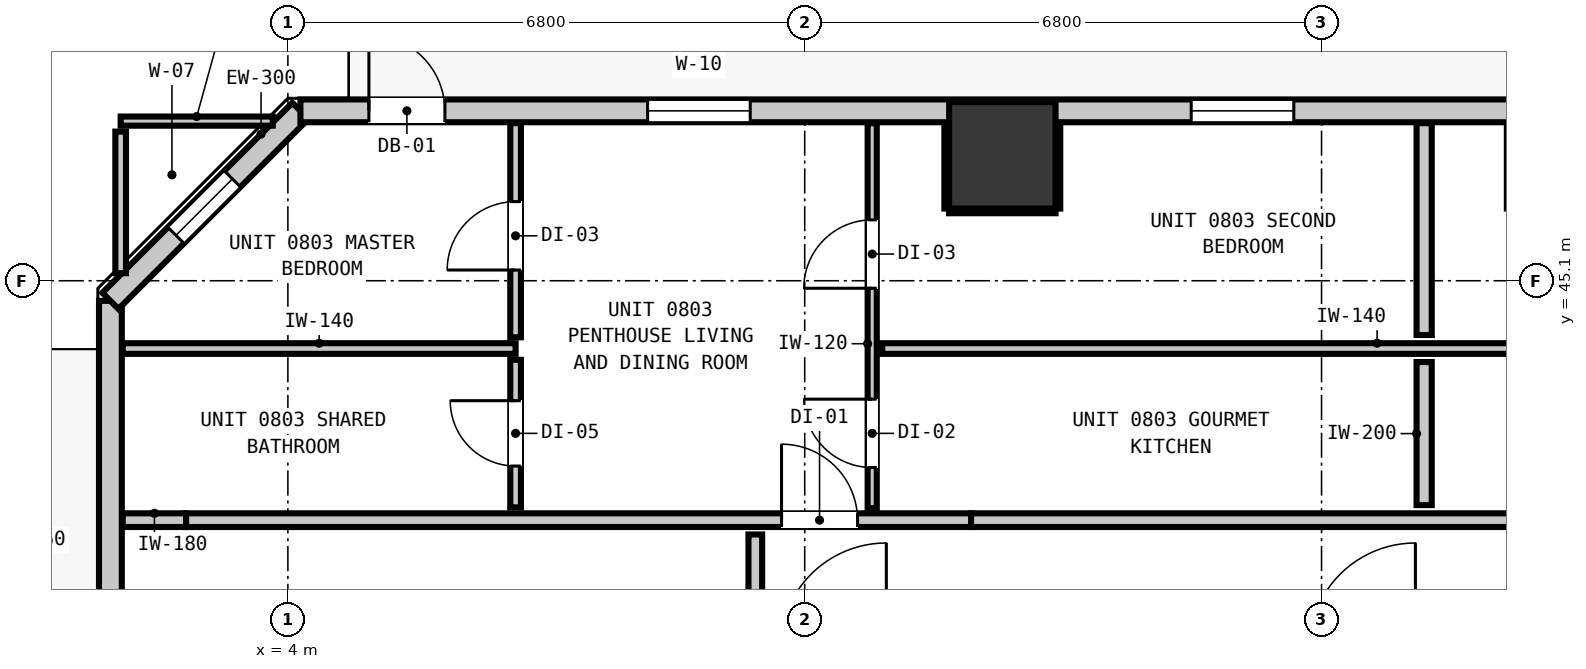
"""IFC4 building model, lengths in metres.
Left out: names, types, materials, properties, quantities, classifications, styles, units other than length and angle.
Written with IfcOpenShell. Run it as: python <this file> out.ifc"""

import sys

from ifc_helpers import new_model, si_unit, direction, frame, frame_2d, origin, origin_2d, place, context, subcontext, project, spatial, rectangle, extrude, element, fill, save


model = new_model("IFC4")
c1 = context("Model", 3, precision=1e-05, world=origin(), true_north=direction((0.0, 1.0)))
c2 = subcontext(c1, "Body", "Model", "MODEL_VIEW")
j1 = project(units=[si_unit("LENGTHUNIT", "METRE"), si_unit("PLANEANGLEUNIT", "RADIAN")], contexts=[c1])
p1 = place(None, origin())
s1 = spatial("IfcSite", under=j1, at=p1, CompositionType="ELEMENT")
p2 = place(p1, origin())
s2 = spatial("IfcBuilding", under=s1, at=p2, CompositionType="ELEMENT")
p3 = place(p2, frame((0.0, 0.0, 31.96)))
s3 = spatial("IfcBuildingStorey", under=s2, at=p3, CompositionType="ELEMENT", Elevation=31.96)
p4 = place(p3, frame((13.4, 46.75, 0.0), z_axis=(0.0, 0.0, 1.0), x_axis=(1.0, 0.0, 0.0)))
e1 = element("IfcColumn", 1, at=p4, inside=s3, PredefinedType="COLUMN", context=c2, shape_type="SweptSolid", body=[
    extrude(rectangle(XDim=1.4, YDim=1.4, at=origin_2d()), origin(), (0.0, 0.0, 1.0), 3.32),
])
p5 = place(p3, frame((1.665, 10.165, 0.0), z_axis=(0.0, 0.0, 1.0), x_axis=(0.0, 1.0, 0.0)))
e2 = element("IfcWall", 2, at=p5, inside=s3, PredefinedType="STANDARD", context=c2, shape_type="SweptSolid", body=[
    extrude(rectangle(XDim=34.67, YDim=0.3, at=frame_2d((17.335, 0.0))), origin(), (0.0, 0.0, 1.0), 3.06),
])
p6 = place(p5, frame((0.901, 0.0, 0.0)))
e3 = element("IfcOpeningElement", 3, at=p6, cuts=e2, PredefinedType="OPENING", context=c2, shape_type="SweptSolid", body=[
    extrude(rectangle(XDim=1.0, YDim=2.15, at=frame_2d((0.5, 1.075))), frame((0.0, 0.16, 0.0), z_axis=(0.0, -1.0, 0.0), x_axis=(1.0, 0.0, 0.0)), (0.0, 0.0, 1.0), 0.32),
])
p7 = place(p5, frame((17.7, 0.0, 0.85)))
e4 = element("IfcOpeningElement", 4, at=p7, cuts=e2, PredefinedType="OPENING", context=c2, shape_type="SweptSolid", body=[
    extrude(rectangle(XDim=1.35, YDim=1.85, at=frame_2d((0.675, 0.925))), frame((0.0, 0.16, 0.0), z_axis=(0.0, -1.0, 0.0), x_axis=(1.0, 0.0, 0.0)), (0.0, 0.0, 1.0), 0.32),
])
p8 = place(p5, frame((13.85, 0.0, 0.85)))
e5 = element("IfcOpeningElement", 5, at=p8, cuts=e2, PredefinedType="OPENING", context=c2, shape_type="SweptSolid", body=[
    extrude(rectangle(XDim=1.35, YDim=1.85, at=frame_2d((0.675, 0.925))), frame((0.0, 0.16, 0.0), z_axis=(0.0, -1.0, 0.0), x_axis=(1.0, 0.0, 0.0)), (0.0, 0.0, 1.0), 0.32),
])
p9 = place(p5, frame((25.87, 0.0, 0.85)))
e6 = element("IfcOpeningElement", 6, at=p9, cuts=e2, PredefinedType="OPENING", context=c2, shape_type="SweptSolid", body=[
    extrude(rectangle(XDim=1.35, YDim=1.85, at=frame_2d((0.675, 0.925))), frame((0.0, 0.16, 0.0), z_axis=(0.0, -1.0, 0.0), x_axis=(1.0, 0.0, 0.0)), (0.0, 0.0, 1.0), 0.32),
])
p10 = place(p3, frame((1.665, 44.835, 0.0), z_axis=(0.0, 0.0, 1.0), x_axis=(0.707106781187, 0.707106781187, 0.0)))
e7 = element("IfcWall", 7, at=p10, inside=s3, PredefinedType="STANDARD", context=c2, shape_type="SweptSolid", body=[
    extrude(rectangle(XDim=3.536, YDim=0.3, at=frame_2d((1.768, 0.0))), origin(), (0.0, 0.0, 1.0), 3.06),
])
p11 = place(p10, frame((1.22, 0.0, 0.85)))
e8 = element("IfcOpeningElement", 8, at=p11, cuts=e7, PredefinedType="OPENING", context=c2, shape_type="SweptSolid", body=[
    extrude(rectangle(XDim=1.05, YDim=1.65, at=frame_2d((0.525, 0.825))), frame((0.0, 0.16, 0.0), z_axis=(0.0, -1.0, 0.0), x_axis=(1.0, 0.0, 0.0)), (0.0, 0.0, 1.0), 0.32),
])
p12 = place(p3, frame((4.165, 47.335, 0.0), z_axis=(0.0, 0.0, 1.0), x_axis=(1.0, 0.0, 0.0)))
e9 = element("IfcWall", 9, at=p12, inside=s3, PredefinedType="STANDARD", context=c2, shape_type="SweptSolid", body=[
    extrude(rectangle(XDim=37.47, YDim=0.3, at=frame_2d((18.735, 0.0))), origin(), (0.0, 0.0, 1.0), 3.06),
])
p13 = place(p12, frame((0.901, 0.0, 0.0)))
e10 = element("IfcOpeningElement", 10, at=p13, cuts=e9, PredefinedType="OPENING", context=c2, shape_type="SweptSolid", body=[
    extrude(rectangle(XDim=1.0, YDim=2.15, at=frame_2d((0.5, 1.075))), frame((0.0, 0.16, 0.0), z_axis=(0.0, -1.0, 0.0), x_axis=(1.0, 0.0, 0.0)), (0.0, 0.0, 1.0), 0.32),
])
p14 = place(p12, frame((4.568, 0.0, 0.85)))
e11 = element("IfcOpeningElement", 11, at=p14, cuts=e9, PredefinedType="OPENING", context=c2, shape_type="SweptSolid", body=[
    extrude(rectangle(XDim=1.35, YDim=1.85, at=frame_2d((0.675, 0.925))), frame((0.0, 0.16, 0.0), z_axis=(0.0, -1.0, 0.0), x_axis=(1.0, 0.0, 0.0)), (0.0, 0.0, 1.0), 0.32),
])
p15 = place(p12, frame((11.72, 0.0, 0.85)))
e12 = element("IfcOpeningElement", 12, at=p15, cuts=e9, PredefinedType="OPENING", context=c2, shape_type="SweptSolid", body=[
    extrude(rectangle(XDim=1.35, YDim=1.85, at=frame_2d((0.675, 0.925))), frame((0.0, 0.16, 0.0), z_axis=(0.0, -1.0, 0.0), x_axis=(1.0, 0.0, 0.0)), (0.0, 0.0, 1.0), 0.32),
])
p16 = place(p12, frame((21.881, 0.0, 0.85)))
e13 = element("IfcOpeningElement", 13, at=p16, cuts=e9, PredefinedType="OPENING", context=c2, shape_type="SweptSolid", body=[
    extrude(rectangle(XDim=1.35, YDim=1.85, at=frame_2d((0.675, 0.925))), frame((0.0, 0.16, 0.0), z_axis=(0.0, -1.0, 0.0), x_axis=(1.0, 0.0, 0.0)), (0.0, 0.0, 1.0), 0.32),
])
p17 = place(p12, frame((18.281, 0.0, 0.85)))
e14 = element("IfcOpeningElement", 14, at=p17, cuts=e9, PredefinedType="OPENING", context=c2, shape_type="SweptSolid", body=[
    extrude(rectangle(XDim=1.35, YDim=1.85, at=frame_2d((0.675, 0.925))), frame((0.0, 0.16, 0.0), z_axis=(0.0, -1.0, 0.0), x_axis=(1.0, 0.0, 0.0)), (0.0, 0.0, 1.0), 0.32),
])
p18 = place(p12, frame((29.263, 0.0, 0.85)))
e15 = element("IfcOpeningElement", 15, at=p18, cuts=e9, PredefinedType="OPENING", context=c2, shape_type="SweptSolid", body=[
    extrude(rectangle(XDim=1.35, YDim=1.85, at=frame_2d((0.675, 0.925))), frame((0.0, 0.16, 0.0), z_axis=(0.0, -1.0, 0.0), x_axis=(1.0, 0.0, 0.0)), (0.0, 0.0, 1.0), 0.32),
])
p19 = place(p12, frame((35.41, 0.0, 0.85)))
e16 = element("IfcOpeningElement", 16, at=p19, cuts=e9, PredefinedType="OPENING", context=c2, shape_type="SweptSolid", body=[
    extrude(rectangle(XDim=1.35, YDim=1.85, at=frame_2d((0.675, 0.925))), frame((0.0, 0.16, 0.0), z_axis=(0.0, -1.0, 0.0), x_axis=(1.0, 0.0, 0.0)), (0.0, 0.0, 1.0), 0.32),
])
p20 = place(p3, frame((1.827, 41.95, 0.0), z_axis=(0.0, 0.0, 1.0), x_axis=(1.0, 0.0, 0.0)))
e17 = element("IfcWall", 17, at=p20, inside=s3, PredefinedType="PARTITIONING", context=c2, shape_type="SweptSolid", body=[
    extrude(rectangle(XDim=0.834, YDim=0.18, at=frame_2d((0.417, 0.0))), origin(), (0.0, 0.0, 1.0), 3.06),
])
p21 = place(p3, frame((2.661, 41.95, 0.0), z_axis=(0.0, 0.0, 1.0), x_axis=(1.0, 0.0, 0.0)))
e18 = element("IfcWall", 18, at=p21, inside=s3, PredefinedType="PARTITIONING", context=c2, shape_type="SweptSolid", body=[
    extrude(rectangle(XDim=10.328, YDim=0.18, at=frame_2d((5.164, 0.0))), origin(), (0.0, 0.0, 1.0), 2.445),
])
p22 = place(p21, frame((7.834, 0.0, 0.0)))
e19 = element("IfcOpeningElement", 19, at=p22, cuts=e18, PredefinedType="OPENING", context=c2, shape_type="SweptSolid", body=[
    extrude(rectangle(XDim=1.0, YDim=2.15, at=frame_2d((0.5, 1.075))), frame((0.0, 0.1, 0.0), z_axis=(0.0, -1.0, 0.0), x_axis=(1.0, 0.0, 0.0)), (0.0, 0.0, 1.0), 0.2),
])
p23 = place(p3, frame((12.989, 41.95, 0.0), z_axis=(0.0, 0.0, 1.0), x_axis=(1.0, 0.0, 0.0)))
e20 = element("IfcWall", 20, at=p23, inside=s3, PredefinedType="PARTITIONING", context=c2, shape_type="SweptSolid", body=[
    extrude(rectangle(XDim=30.984, YDim=0.18, at=frame_2d((15.492, 0.0))), origin(), (0.0, 0.0, 1.0), 3.06),
])
p24 = place(p23, frame((14.765, 0.0, 0.0)))
e21 = element("IfcOpeningElement", 21, at=p24, cuts=e20, PredefinedType="OPENING", context=c2, shape_type="SweptSolid", body=[
    extrude(rectangle(XDim=1.0, YDim=2.15, at=frame_2d((0.5, 1.075))), frame((0.0, 0.1, 0.0), z_axis=(0.0, -1.0, 0.0), x_axis=(1.0, 0.0, 0.0)), (0.0, 0.0, 1.0), 0.2),
])
p25 = place(p3, frame((1.827, 44.208, 0.0), z_axis=(0.0, 0.0, 1.0), x_axis=(1.0, 0.0, 0.0)))
e22 = element("IfcWall", 22, at=p25, inside=s3, PredefinedType="PARTITIONING", context=c2, shape_type="SweptSolid", body=[
    extrude(rectangle(XDim=5.169, YDim=0.14, at=frame_2d((2.584, 0.0))), origin(), (0.0, 0.0, 1.0), 3.06),
])
p26 = place(p3, frame((11.82, 44.208, 0.0), z_axis=(0.0, 0.0, 1.0), x_axis=(1.0, 0.0, 0.0)))
e23 = element("IfcWall", 23, at=p26, inside=s3, PredefinedType="PARTITIONING", context=c2, shape_type="SweptSolid", body=[
    extrude(rectangle(XDim=13.022, YDim=0.14, at=frame_2d((6.511, 0.0))), origin(), (0.0, 0.0, 1.0), 3.06),
])
p27 = place(p3, frame((1.8, 47.2, 0.0), z_axis=(0.0, 0.0, 1.0), x_axis=(1.0, 0.0, 0.0)))
e24 = element("IfcWall", 24, at=p27, inside=s3, PredefinedType="PARTITIONING", context=c2, shape_type="SweptSolid", body=[
    extrude(rectangle(XDim=2.001, YDim=0.12, at=frame_2d((1.0, 0.0))), origin(), (0.0, 0.0, 1.0), 3.06),
])
p28 = place(p3, frame((18.95, 42.148, 0.0), z_axis=(0.0, 0.0, 1.0), x_axis=(0.0, 1.0, 0.0)))
e25 = element("IfcWall", 25, at=p28, inside=s3, PredefinedType="PARTITIONING", context=c2, shape_type="SweptSolid", body=[
    extrude(rectangle(XDim=1.882, YDim=0.2, at=frame_2d((0.941, 0.0))), origin(), (0.0, 0.0, 1.0), 3.06),
])
p29 = place(p3, frame((18.95, 44.386, 0.0), z_axis=(0.0, 0.0, 1.0), x_axis=(0.0, 1.0, 0.0)))
e26 = element("IfcWall", 26, at=p29, inside=s3, PredefinedType="PARTITIONING", context=c2, shape_type="SweptSolid", body=[
    extrude(rectangle(XDim=2.787, YDim=0.2, at=frame_2d((1.394, 0.0))), origin(), (0.0, 0.0, 1.0), 3.06),
])
p30 = place(p3, frame((10.15, 40.438, 0.0), z_axis=(0.0, 0.0, 1.0), x_axis=(0.0, 1.0, 0.0)))
e27 = element("IfcWall", 27, at=p30, inside=s3, PredefinedType="PARTITIONING", context=c2, shape_type="SweptSolid", body=[
    extrude(rectangle(XDim=1.324, YDim=0.18, at=frame_2d((0.662, 0.0))), origin(), (0.0, 0.0, 1.0), 3.06),
])
p31 = place(p3, frame((1.8, 45.199, 0.0), z_axis=(0.0, 0.0, 1.0), x_axis=(0.0, 1.0, 0.0)))
e28 = element("IfcWall", 28, at=p31, inside=s3, PredefinedType="PARTITIONING", context=c2, shape_type="SweptSolid", body=[
    extrude(rectangle(XDim=1.863, YDim=0.14, at=frame_2d((0.932, 0.0))), origin(), (0.0, 0.0, 1.0), 3.06),
])
p32 = place(p3, frame((6.996, 42.118, 0.0), z_axis=(0.0, 0.0, 1.0), x_axis=(0.0, 1.0, 0.0)))
e29 = element("IfcWall", 29, at=p32, inside=s3, PredefinedType="PARTITIONING", context=c2, shape_type="SweptSolid", body=[
    extrude(rectangle(XDim=1.942, YDim=0.14, at=frame_2d((0.971, 0.0))), origin(), (0.0, 0.0, 1.0), 3.06),
])
p33 = place(p32, frame((0.544, 0.0, 0.0)))
e30 = element("IfcOpeningElement", 30, at=p33, cuts=e29, PredefinedType="OPENING", context=c2, shape_type="SweptSolid", body=[
    extrude(rectangle(XDim=0.86, YDim=2.02, at=frame_2d((0.43, 1.01))), frame((0.0, 0.08, 0.0), z_axis=(0.0, -1.0, 0.0), x_axis=(1.0, 0.0, 0.0)), (0.0, 0.0, 1.0), 0.16),
])
p34 = place(p3, frame((6.996, 44.356, 0.0), z_axis=(0.0, 0.0, 1.0), x_axis=(0.0, 1.0, 0.0)))
e31 = element("IfcWall", 31, at=p34, inside=s3, PredefinedType="PARTITIONING", context=c2, shape_type="SweptSolid", body=[
    extrude(rectangle(XDim=2.817, YDim=0.14, at=frame_2d((1.409, 0.0))), origin(), (0.0, 0.0, 1.0), 3.06),
])
p35 = place(p34, frame((0.885, 0.0, 0.0)))
e32 = element("IfcOpeningElement", 32, at=p35, cuts=e31, PredefinedType="OPENING", context=c2, shape_type="SweptSolid", body=[
    extrude(rectangle(XDim=0.9, YDim=2.1, at=frame_2d((0.45, 1.05))), frame((0.0, 0.08, 0.0), z_axis=(0.0, -1.0, 0.0), x_axis=(1.0, 0.0, 0.0)), (0.0, 0.0, 1.0), 0.16),
])
p36 = place(p3, frame((11.688, 42.108, 0.0), z_axis=(0.0, 0.0, 1.0), x_axis=(0.0, 1.0, 0.0)))
e33 = element("IfcWall", 33, at=p36, inside=s3, PredefinedType="PARTITIONING", context=c2, shape_type="SweptSolid", body=[
    extrude(rectangle(XDim=5.065, YDim=0.12, at=frame_2d((2.533, 0.0))), origin(), (0.0, 0.0, 1.0), 3.06),
])
p37 = place(p36, frame((0.534, 0.0, 0.0)))
e34 = element("IfcOpeningElement", 34, at=p37, cuts=e33, PredefinedType="OPENING", context=c2, shape_type="SweptSolid", body=[
    extrude(rectangle(XDim=0.9, YDim=2.1, at=frame_2d((0.45, 1.05))), frame((0.0, 0.07, 0.0), z_axis=(0.0, -1.0, 0.0), x_axis=(1.0, 0.0, 0.0)), (0.0, 0.0, 1.0), 0.14),
])
p38 = place(p36, frame((2.893, 0.0, 0.0)))
e35 = element("IfcOpeningElement", 35, at=p38, cuts=e33, PredefinedType="OPENING", context=c2, shape_type="SweptSolid", body=[
    extrude(rectangle(XDim=0.9, YDim=2.1, at=frame_2d((0.45, 1.05))), frame((0.0, 0.07, 0.0), z_axis=(0.0, -1.0, 0.0), x_axis=(1.0, 0.0, 0.0)), (0.0, 0.0, 1.0), 0.14),
])
p39 = place(p3, frame((12.7, 46.018, 0.0), z_axis=(0.0, 0.0, 1.0), x_axis=(1.0, 0.0, 0.0)))
e36 = element("IfcWall", 36, at=p39, inside=s3, PredefinedType="PARTITIONING", context=c2, shape_type="SweptSolid", body=[
    extrude(rectangle(XDim=1.4, YDim=0.06, at=frame_2d((0.7, 0.0))), origin(), (0.0, 0.0, 1.0), 1.45),
])
for number, where, z_axis, x_axis in (
    (37, (12.668, 46.05, 0.0), (0.0, 0.0, 1.0), (0.0, 1.0, 0.0)),
    (38, (14.132, 46.05, 0.0), (0.0, 0.0, 1.0), (0.0, 1.0, 0.0)),
):
    element("IfcWall", number, at=place(p3, frame(where, z_axis=z_axis, x_axis=x_axis)), inside=s3, PredefinedType="PARTITIONING", context=c2, shape_type="SweptSolid", body=[
        extrude(rectangle(XDim=1.12, YDim=0.06, at=frame_2d((0.56, 0.0))), origin(), (0.0, 0.0, 1.0), 1.45),
    ])
p40 = place(p13, origin())
e39 = element("IfcDoor", 39, at=p40, inside=s3, OperationType="SINGLE_SWING_LEFT", PredefinedType="DOOR", context=c2, shape_type="SweptSolid", body=[
    extrude(rectangle(XDim=1.0, YDim=2.15, at=frame_2d((0.5, 1.075))), frame((0.0, 0.025, 0.0), z_axis=(0.0, -1.0, 0.0), x_axis=(1.0, 0.0, 0.0)), (0.0, 0.0, 1.0), 0.05),
])
fill(e10, e39)
p41 = place(p14, origin())
e40 = element("IfcWindow", 40, at=p41, inside=s3, PartitioningType="SINGLE_PANEL", PredefinedType="WINDOW", context=c2, shape_type="SweptSolid", body=[
    extrude(rectangle(XDim=1.35, YDim=1.85, at=frame_2d((0.675, 0.925))), frame((0.0, 0.03, 0.0), z_axis=(0.0, -1.0, 0.0), x_axis=(1.0, 0.0, 0.0)), (0.0, 0.0, 1.0), 0.06),
])
fill(e11, e40)
p42 = place(p15, origin())
e41 = element("IfcWindow", 41, at=p42, inside=s3, PartitioningType="SINGLE_PANEL", PredefinedType="WINDOW", context=c2, shape_type="SweptSolid", body=[
    extrude(rectangle(XDim=1.35, YDim=1.85, at=frame_2d((0.675, 0.925))), frame((0.0, 0.03, 0.0), z_axis=(0.0, -1.0, 0.0), x_axis=(1.0, 0.0, 0.0)), (0.0, 0.0, 1.0), 0.06),
])
fill(e12, e41)
p43 = place(p11, origin())
e42 = element("IfcWindow", 42, at=p43, inside=s3, PartitioningType="SINGLE_PANEL", PredefinedType="WINDOW", context=c2, shape_type="SweptSolid", body=[
    extrude(rectangle(XDim=1.05, YDim=1.65, at=frame_2d((0.525, 0.825))), frame((0.0, 0.03, 0.0), z_axis=(0.0, -1.0, 0.0), x_axis=(1.0, 0.0, 0.0)), (0.0, 0.0, 1.0), 0.06),
])
fill(e8, e42)
p44 = place(p22, origin())
e43 = element("IfcDoor", 43, at=p44, inside=s3, OperationType="SINGLE_SWING_LEFT", PredefinedType="DOOR", context=c2, shape_type="SweptSolid", body=[
    extrude(rectangle(XDim=1.0, YDim=2.15, at=frame_2d((0.5, 1.075))), frame((0.0, 0.025, 0.0), z_axis=(0.0, -1.0, 0.0), x_axis=(1.0, 0.0, 0.0)), (0.0, 0.0, 1.0), 0.05),
])
fill(e19, e43)
p45 = place(p33, origin())
e44 = element("IfcDoor", 44, at=p45, inside=s3, OperationType="SINGLE_SWING_RIGHT", PredefinedType="DOOR", context=c2, shape_type="SweptSolid", body=[
    extrude(rectangle(XDim=0.86, YDim=2.02, at=frame_2d((0.43, 1.01))), frame((0.0, 0.025, 0.0), z_axis=(0.0, -1.0, 0.0), x_axis=(1.0, 0.0, 0.0)), (0.0, 0.0, 1.0), 0.05),
])
fill(e30, e44)
p46 = place(p35, origin())
e45 = element("IfcDoor", 45, at=p46, inside=s3, OperationType="SINGLE_SWING_LEFT", PredefinedType="DOOR", context=c2, shape_type="SweptSolid", body=[
    extrude(rectangle(XDim=0.9, YDim=2.1, at=frame_2d((0.45, 1.05))), frame((0.0, 0.025, 0.0), z_axis=(0.0, -1.0, 0.0), x_axis=(1.0, 0.0, 0.0)), (0.0, 0.0, 1.0), 0.05),
])
fill(e32, e45)
p47 = place(p37, origin())
e46 = element("IfcDoor", 46, at=p47, inside=s3, OperationType="SINGLE_SWING_RIGHT", PredefinedType="DOOR", context=c2, shape_type="SweptSolid", body=[
    extrude(rectangle(XDim=0.9, YDim=2.1, at=frame_2d((0.45, 1.05))), frame((0.0, 0.025, 0.0), z_axis=(0.0, -1.0, 0.0), x_axis=(1.0, 0.0, 0.0)), (0.0, 0.0, 1.0), 0.05),
])
fill(e34, e46)
p48 = place(p38, origin())
e47 = element("IfcDoor", 47, at=p48, inside=s3, OperationType="SINGLE_SWING_LEFT", PredefinedType="DOOR", context=c2, shape_type="SweptSolid", body=[
    extrude(rectangle(XDim=0.9, YDim=2.1, at=frame_2d((0.45, 1.05))), frame((0.0, 0.025, 0.0), z_axis=(0.0, -1.0, 0.0), x_axis=(1.0, 0.0, 0.0)), (0.0, 0.0, 1.0), 0.05),
])
fill(e35, e47)
save(model, sys.argv[1])
